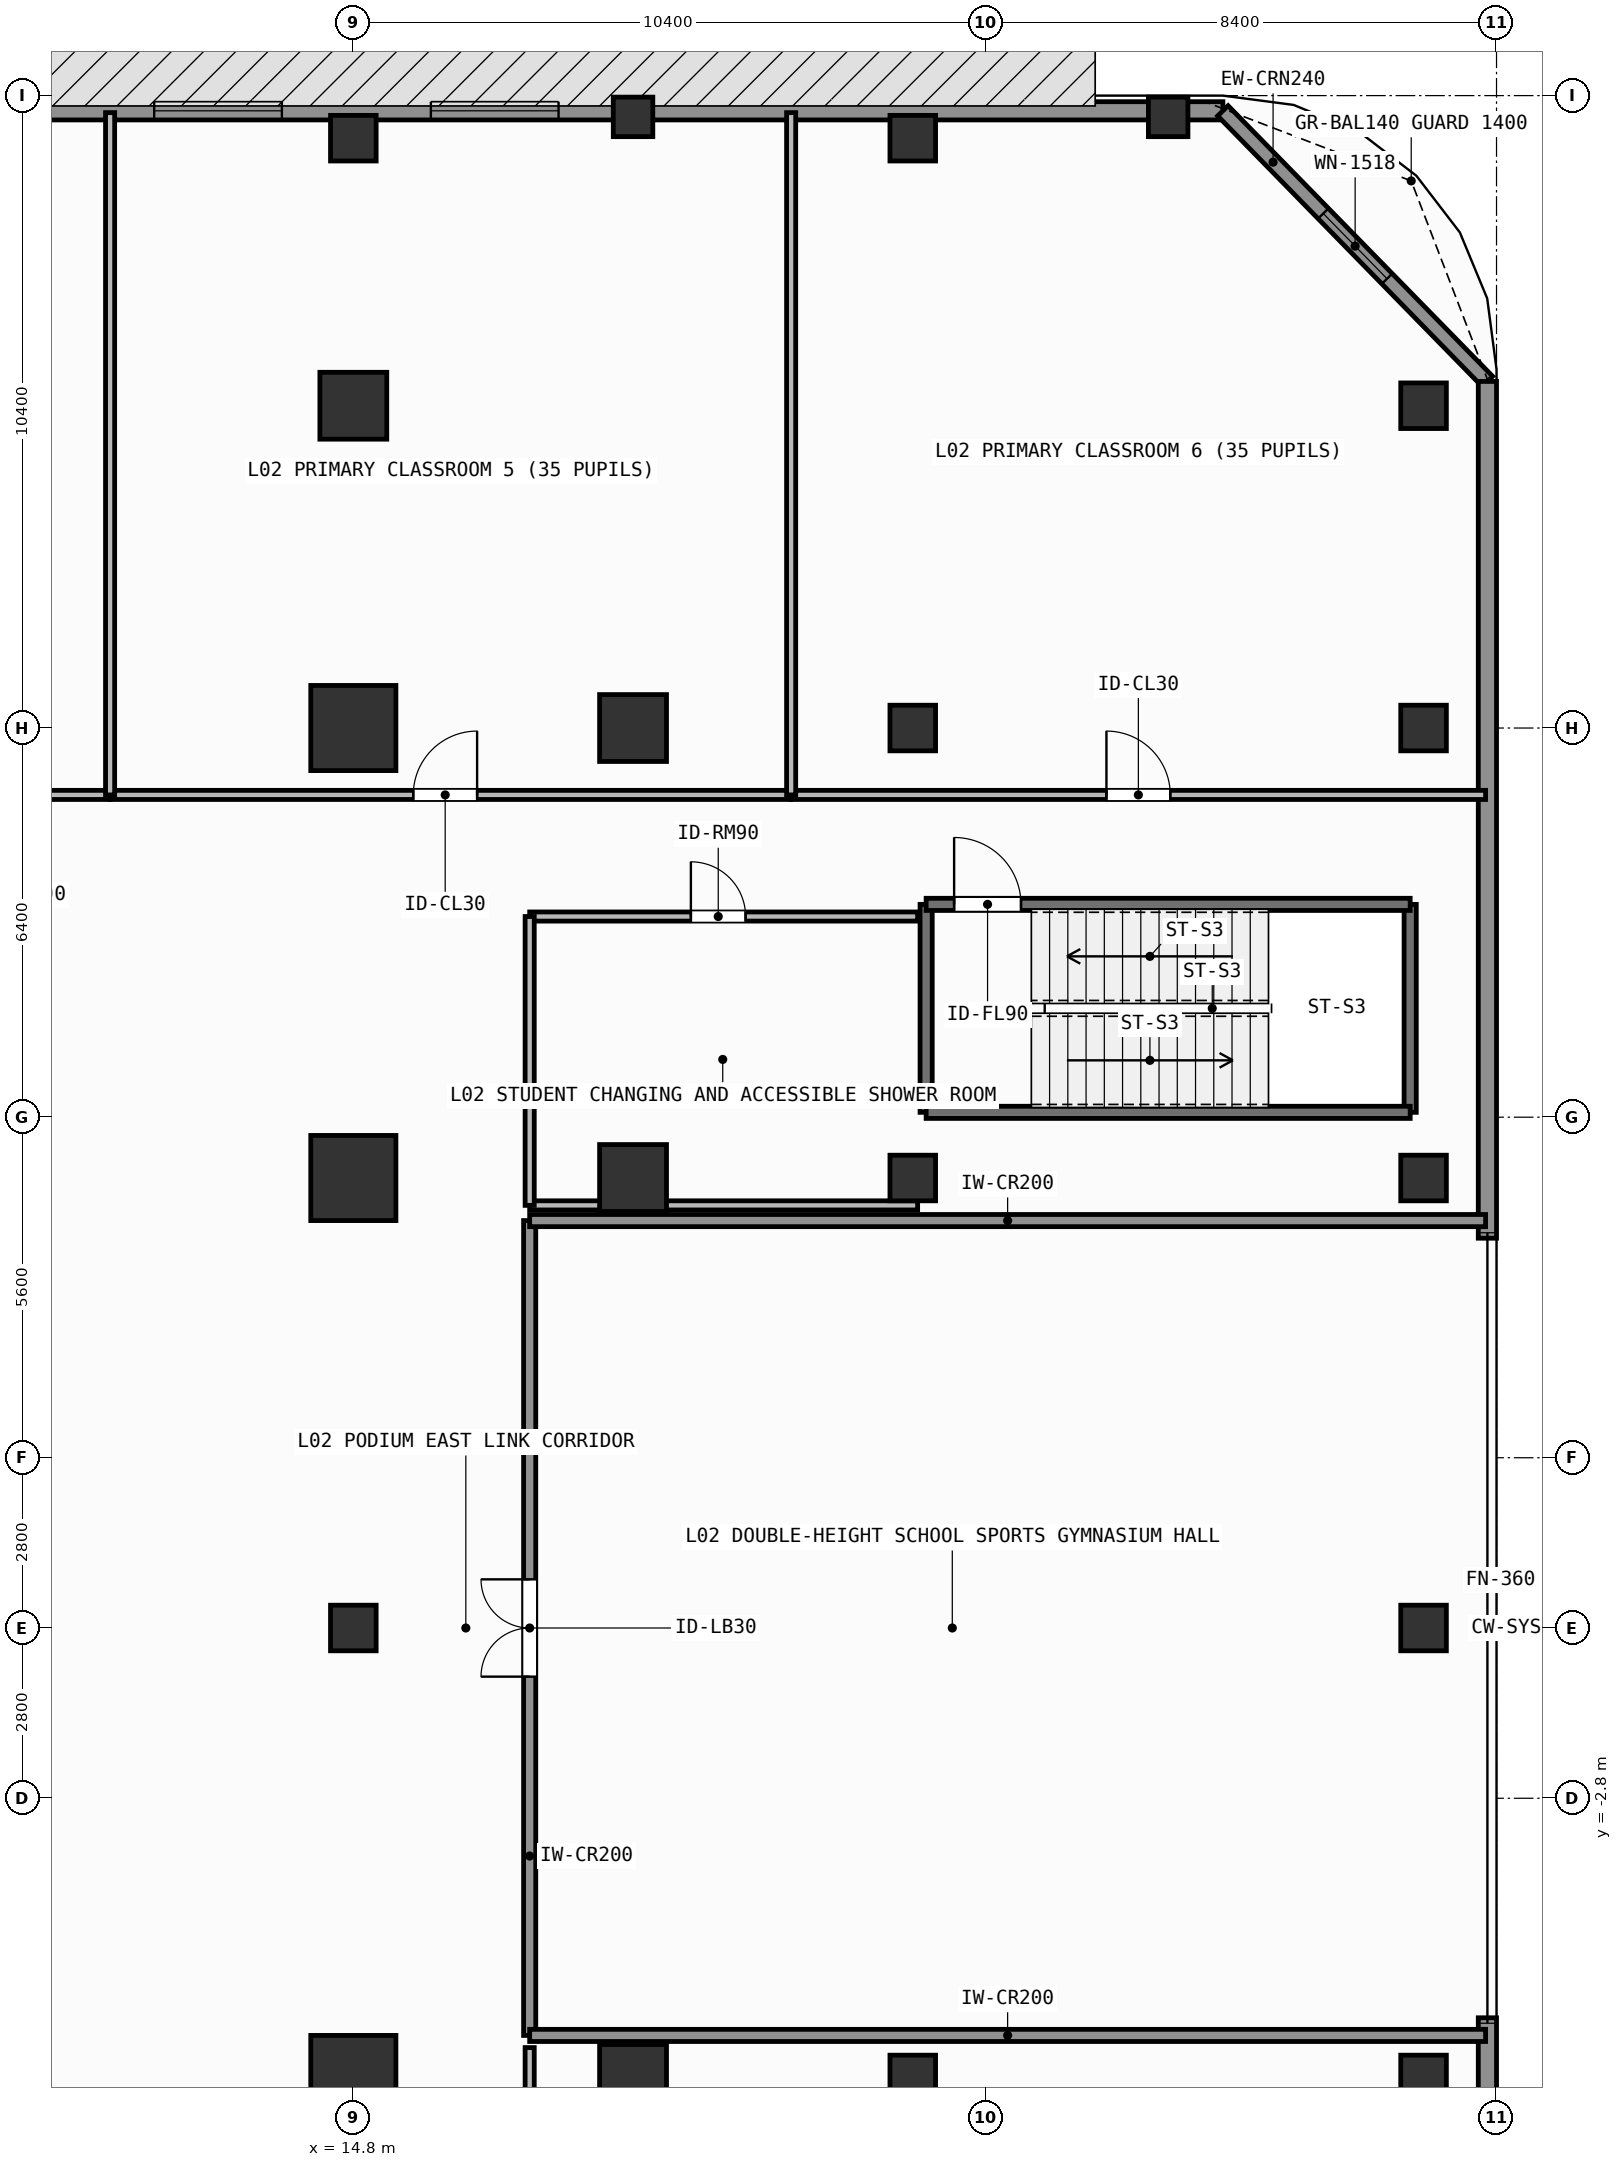
"""IFC4 building model, lengths in metres.
Left out: names, types, materials, properties, quantities, classifications, styles, units other than length and angle.
Written with IfcOpenShell. Run it as: python <this file> out.ifc"""

import sys

from ifc_helpers import new_model, si_unit, direction, frame, frame_2d, origin, origin_2d, place, context, subcontext, project, spatial, rectangle, extrude, element, fill, save


model = new_model("IFC4")
c1 = context("Model", 3, precision=1e-05, world=origin(), true_north=direction((0.0, 1.0)))
c2 = subcontext(c1, "Body", "Model", "MODEL_VIEW")
j1 = project(units=[si_unit("LENGTHUNIT", "METRE"), si_unit("PLANEANGLEUNIT", "RADIAN")], contexts=[c1])
p1 = place(None, origin())
s1 = spatial("IfcSite", under=j1, at=p1, CompositionType="ELEMENT")
p2 = place(p1, origin())
s2 = spatial("IfcBuilding", under=s1, at=p2, CompositionType="ELEMENT")
p3 = place(p2, frame((0.0, 0.0, 4.8)))
s3 = spatial("IfcBuildingStorey", under=s2, at=p3, CompositionType="ELEMENT", Elevation=4.8)
for number, where, z_axis, x_axis in (
    (1, (14.8, 14.8, 0.0), (0.0, 0.0, 1.0), (1.0, 0.0, 0.0)),
    (2, (14.8, -7.4, 0.0), (0.0, 0.0, 1.0), (1.0, 0.0, 0.0)),
    (3, (14.8, 7.4, 0.0), (0.0, 0.0, 1.0), (1.0, 0.0, 0.0)),
):
    element("IfcColumn", number, at=place(p3, frame(where, z_axis=z_axis, x_axis=x_axis)), inside=s3, PredefinedType="COLUMN", context=c2, shape_type="SweptSolid", body=[
        extrude(rectangle(XDim=1.4, YDim=1.4, at=origin_2d()), origin(), (0.0, 0.0, 1.0), 4.2),
    ])
for number, where, z_axis, x_axis in (
    (4, (19.4, -7.4, 0.0), (0.0, 0.0, 1.0), (1.0, 0.0, 0.0)),
    (5, (19.4, 7.4, 0.0), (0.0, 0.0, 1.0), (1.0, 0.0, 0.0)),
    (6, (19.4, 14.8, 0.0), (0.0, 0.0, 1.0), (1.0, 0.0, 0.0)),
    (7, (14.8, 20.1, 0.0), (0.0, 0.0, 1.0), (1.0, 0.0, 0.0)),
):
    element("IfcColumn", number, at=place(p3, frame(where, z_axis=z_axis, x_axis=x_axis)), inside=s3, PredefinedType="COLUMN", context=c2, shape_type="SweptSolid", body=[
        extrude(rectangle(XDim=1.1, YDim=1.1, at=origin_2d()), origin(), (0.0, 0.0, 1.0), 4.2),
    ])
for number, where, z_axis, x_axis in (
    (8, (14.8, 0.0, 0.0), (0.0, 0.0, 1.0), (1.0, 0.0, 0.0)),
    (9, (14.8, 24.5, 0.0), (0.0, 0.0, 1.0), (1.0, 0.0, 0.0)),
    (10, (24.0, -7.4, 0.0), (0.0, 0.0, 1.0), (1.0, 0.0, 0.0)),
    (11, (24.0, 7.4, 0.0), (0.0, 0.0, 1.0), (1.0, 0.0, 0.0)),
    (12, (24.0, 14.8, 0.0), (0.0, 0.0, 1.0), (1.0, 0.0, 0.0)),
    (13, (24.0, 24.5, 0.0), (0.0, 0.0, 1.0), (1.0, 0.0, 0.0)),
    (14, (32.4, -7.4, 0.0), (0.0, 0.0, 1.0), (1.0, 0.0, 0.0)),
    (15, (32.4, 0.0, 0.0), (0.0, 0.0, 1.0), (1.0, 0.0, 0.0)),
    (16, (32.4, 7.4, 0.0), (0.0, 0.0, 1.0), (1.0, 0.0, 0.0)),
    (17, (32.4, 14.8, 0.0), (0.0, 0.0, 1.0), (1.0, 0.0, 0.0)),
    (18, (32.4, 20.1, 0.0), (0.0, 0.0, 1.0), (1.0, 0.0, 0.0)),
):
    element("IfcColumn", number, at=place(p3, frame(where, z_axis=z_axis, x_axis=x_axis)), inside=s3, PredefinedType="COLUMN", context=c2, shape_type="SweptSolid", body=[
        extrude(rectangle(XDim=0.75, YDim=0.75, at=origin_2d()), origin(), (0.0, 0.0, 1.0), 4.2),
    ])
for number, where, z_axis, x_axis in (
    (19, (19.4, 24.85, 0.0), (0.0, 0.0, 1.0), (1.0, 0.0, 0.0)),
    (20, (28.2, 24.85, 0.0), (0.0, 0.0, 1.0), (1.0, 0.0, 0.0)),
):
    element("IfcColumn", number, at=place(p3, frame(where, z_axis=z_axis, x_axis=x_axis)), inside=s3, PredefinedType="PILASTER", context=c2, shape_type="SweptSolid", body=[
        extrude(rectangle(XDim=0.65, YDim=0.65, at=origin_2d()), origin(), (0.0, 0.0, 1.0), 4.2),
    ])
p4 = place(p3, frame((-29.1, 24.95, 0.0), z_axis=(0.0, 0.0, 1.0), x_axis=(1.0, 0.0, 0.0)))
e21 = element("IfcWall", 21, at=p4, inside=s3, PredefinedType="SOLIDWALL", context=c2, shape_type="SweptSolid", body=[
    extrude(rectangle(XDim=58.2, YDim=0.3, at=frame_2d((29.1, 0.0))), origin(), (0.0, 0.0, 1.0), 3.96),
])
p5 = place(p4, frame((24.35, 0.0, 0.85)))
e22 = element("IfcOpeningElement", 22, at=p5, cuts=e21, PredefinedType="OPENING", context=c2, shape_type="SweptSolid", body=[
    extrude(rectangle(XDim=2.1, YDim=2.2, at=frame_2d((1.05, 1.1))), frame((0.0, 0.16, 0.0), z_axis=(0.0, -1.0, 0.0), x_axis=(1.0, 0.0, 0.0)), (0.0, 0.0, 1.0), 0.32),
])
p6 = place(p4, frame((31.75, 0.0, 0.85)))
e23 = element("IfcOpeningElement", 23, at=p6, cuts=e21, PredefinedType="OPENING", context=c2, shape_type="SweptSolid", body=[
    extrude(rectangle(XDim=2.1, YDim=2.2, at=frame_2d((1.05, 1.1))), frame((0.0, 0.16, 0.0), z_axis=(0.0, -1.0, 0.0), x_axis=(1.0, 0.0, 0.0)), (0.0, 0.0, 1.0), 0.32),
])
p7 = place(p4, frame((40.625, 0.0, 0.85)))
e24 = element("IfcOpeningElement", 24, at=p7, cuts=e21, PredefinedType="OPENING", context=c2, shape_type="SweptSolid", body=[
    extrude(rectangle(XDim=2.1, YDim=2.2, at=frame_2d((1.05, 1.1))), frame((0.0, 0.16, 0.0), z_axis=(0.0, -1.0, 0.0), x_axis=(1.0, 0.0, 0.0)), (0.0, 0.0, 1.0), 0.32),
])
p8 = place(p4, frame((45.175, 0.0, 0.85)))
e25 = element("IfcOpeningElement", 25, at=p8, cuts=e21, PredefinedType="OPENING", context=c2, shape_type="SweptSolid", body=[
    extrude(rectangle(XDim=2.1, YDim=2.2, at=frame_2d((1.05, 1.1))), frame((0.0, 0.16, 0.0), z_axis=(0.0, -1.0, 0.0), x_axis=(1.0, 0.0, 0.0)), (0.0, 0.0, 1.0), 0.32),
])
p9 = place(p3, frame((29.1, 24.95, 0.0), z_axis=(0.0, 0.0, 1.0), x_axis=(0.69901822973, -0.715103848756, 0.0)))
e26 = element("IfcWall", 26, at=p9, inside=s3, PredefinedType="SOLIDWALL", context=c2, shape_type="SweptSolid", body=[
    extrude(rectangle(XDim=6.223, YDim=0.24, at=frame_2d((3.111, 0.0))), origin(), (0.0, 0.0, 1.0), 3.96),
])
p10 = place(p9, frame((2.362, 0.0, 0.85)))
e27 = element("IfcOpeningElement", 27, at=p10, cuts=e26, PredefinedType="OPENING", context=c2, shape_type="SweptSolid", body=[
    extrude(rectangle(XDim=1.5, YDim=1.85, at=frame_2d((0.75, 0.925))), frame((0.0, 0.13, 0.0), z_axis=(0.0, -1.0, 0.0), x_axis=(1.0, 0.0, 0.0)), (0.0, 0.0, 1.0), 0.26),
])
for number, where, z_axis, x_axis in (
    (28, (33.45, -20.5, 0.0), (0.0, 0.0, 1.0), (0.0, 1.0, 0.0)),
    (29, (33.45, 6.41, 0.0), (0.0, 0.0, 1.0), (0.0, 1.0, 0.0)),
):
    element("IfcWall", number, at=place(p3, frame(where, z_axis=z_axis, x_axis=x_axis)), inside=s3, PredefinedType="SOLIDWALL", context=c2, shape_type="SweptSolid", body=[
        extrude(rectangle(XDim=14.09, YDim=0.3, at=frame_2d((7.045, 0.0))), origin(), (0.0, 0.0, 1.0), 3.96),
    ])
for number, where, z_axis, x_axis in (
    (30, (24.22, 8.48, 0.0), (0.0, 0.0, 1.0), (0.0, 1.0, 0.0)),
    (31, (32.18, 11.9, 0.0), (0.0, 0.0, 1.0), (0.0, -1.0, 0.0)),
):
    element("IfcWall", number, at=place(p3, frame(where, z_axis=z_axis, x_axis=x_axis)), inside=s3, PredefinedType="SHEAR", context=c2, shape_type="SweptSolid", body=[
        extrude(rectangle(XDim=3.42, YDim=0.2, at=frame_2d((1.71, 0.0))), origin(), (0.0, 0.0, 1.0), 3.96),
    ])
p11 = place(p3, frame((32.18, 8.48, 0.0), z_axis=(0.0, 0.0, 1.0), x_axis=(-1.0, 0.0, 0.0)))
e32 = element("IfcWall", 32, at=p11, inside=s3, PredefinedType="SHEAR", context=c2, shape_type="SweptSolid", body=[
    extrude(rectangle(XDim=7.96, YDim=0.2, at=frame_2d((3.98, 0.0))), origin(), (0.0, 0.0, 1.0), 3.96),
])
p12 = place(p3, frame((24.22, 11.9, 0.0), z_axis=(0.0, 0.0, 1.0), x_axis=(1.0, 0.0, 0.0)))
e33 = element("IfcWall", 33, at=p12, inside=s3, PredefinedType="SHEAR", context=c2, shape_type="SweptSolid", body=[
    extrude(rectangle(XDim=7.96, YDim=0.2, at=frame_2d((3.98, 0.0))), origin(), (0.0, 0.0, 1.0), 3.96),
])
p13 = place(p12, frame((0.46, 0.0, 0.0)))
e34 = element("IfcOpeningElement", 34, at=p13, cuts=e33, PredefinedType="OPENING", context=c2, shape_type="SweptSolid", body=[
    extrude(rectangle(XDim=1.1, YDim=2.15, at=frame_2d((0.55, 1.075))), frame((0.0, 0.11, 0.0), z_axis=(0.0, -1.0, 0.0), x_axis=(1.0, 0.0, 0.0)), (0.0, 0.0, 1.0), 0.22),
])
p14 = place(p3, frame((-0.2, 13.7, 0.0), z_axis=(0.0, 0.0, 1.0), x_axis=(1.0, 0.0, 0.0)))
e35 = element("IfcWall", 35, at=p14, inside=s3, PredefinedType="PARTITIONING", context=c2, shape_type="SweptSolid", body=[
    extrude(rectangle(XDim=11.0, YDim=0.15, at=frame_2d((5.5, 0.0))), origin(), (0.0, 0.0, 1.0), 3.96),
])
p15 = place(p14, frame((4.975, 0.0, 0.0)))
e36 = element("IfcOpeningElement", 36, at=p15, cuts=e35, PredefinedType="OPENING", context=c2, shape_type="SweptSolid", body=[
    extrude(rectangle(XDim=1.05, YDim=2.2, at=frame_2d((0.525, 1.1))), frame((0.0, 0.085, 0.0), z_axis=(0.0, -1.0, 0.0), x_axis=(1.0, 0.0, 0.0)), (0.0, 0.0, 1.0), 0.17),
])
p16 = place(p3, frame((10.8, 13.7, 0.0), z_axis=(0.0, 0.0, 1.0), x_axis=(1.0, 0.0, 0.0)))
e37 = element("IfcWall", 37, at=p16, inside=s3, PredefinedType="PARTITIONING", context=c2, shape_type="SweptSolid", body=[
    extrude(rectangle(XDim=11.2, YDim=0.15, at=frame_2d((5.6, 0.0))), origin(), (0.0, 0.0, 1.0), 3.96),
])
p17 = place(p16, frame((4.986, 0.0, 0.0)))
e38 = element("IfcOpeningElement", 38, at=p17, cuts=e37, PredefinedType="OPENING", context=c2, shape_type="SweptSolid", body=[
    extrude(rectangle(XDim=1.05, YDim=2.2, at=frame_2d((0.525, 1.1))), frame((0.0, 0.085, 0.0), z_axis=(0.0, -1.0, 0.0), x_axis=(1.0, 0.0, 0.0)), (0.0, 0.0, 1.0), 0.17),
])
p18 = place(p3, frame((22.0, 13.7, 0.0), z_axis=(0.0, 0.0, 1.0), x_axis=(1.0, 0.0, 0.0)))
e39 = element("IfcWall", 39, at=p18, inside=s3, PredefinedType="PARTITIONING", context=c2, shape_type="SweptSolid", body=[
    extrude(rectangle(XDim=11.42, YDim=0.15, at=frame_2d((5.71, 0.0))), origin(), (0.0, 0.0, 1.0), 3.96),
])
p19 = place(p18, frame((5.185, 0.0, 0.0)))
e40 = element("IfcOpeningElement", 40, at=p19, cuts=e39, PredefinedType="OPENING", context=c2, shape_type="SweptSolid", body=[
    extrude(rectangle(XDim=1.05, YDim=2.2, at=frame_2d((0.525, 1.1))), frame((0.0, 0.085, 0.0), z_axis=(0.0, -1.0, 0.0), x_axis=(1.0, 0.0, 0.0)), (0.0, 0.0, 1.0), 0.17),
])
p20 = place(p3, frame((17.7, -6.7, 0.0), z_axis=(0.0, 0.0, 1.0), x_axis=(0.0, 1.0, 0.0)))
e41 = element("IfcWall", 41, at=p20, inside=s3, PredefinedType="SOLIDWALL", context=c2, shape_type="SweptSolid", body=[
    extrude(rectangle(XDim=13.4, YDim=0.2, at=frame_2d((6.7, 0.0))), origin(), (0.0, 0.0, 1.0), 3.96),
])
p21 = place(p20, frame((5.9, 0.0, 0.0)))
e42 = element("IfcOpeningElement", 42, at=p21, cuts=e41, PredefinedType="OPENING", context=c2, shape_type="SweptSolid", body=[
    extrude(rectangle(XDim=1.6, YDim=2.3, at=frame_2d((0.8, 1.15))), frame((0.0, 0.11, 0.0), z_axis=(0.0, -1.0, 0.0), x_axis=(1.0, 0.0, 0.0)), (0.0, 0.0, 1.0), 0.22),
])
p22 = place(p3, frame((17.7, 11.7, 0.0), z_axis=(0.0, 0.0, 1.0), x_axis=(1.0, 0.0, 0.0)))
e43 = element("IfcWall", 43, at=p22, inside=s3, PredefinedType="PARTITIONING", context=c2, shape_type="SweptSolid", body=[
    extrude(rectangle(XDim=6.38, YDim=0.15, at=frame_2d((3.19, 0.0))), origin(), (0.0, 0.0, 1.0), 3.96),
])
p23 = place(p22, frame((2.651, 0.0, 0.0)))
e44 = element("IfcOpeningElement", 44, at=p23, cuts=e43, PredefinedType="OPENING", context=c2, shape_type="SweptSolid", body=[
    extrude(rectangle(XDim=0.9, YDim=2.1, at=frame_2d((0.45, 1.05))), frame((0.0, 0.085, 0.0), z_axis=(0.0, -1.0, 0.0), x_axis=(1.0, 0.0, 0.0)), (0.0, 0.0, 1.0), 0.17),
])
p24 = place(p3, frame((17.7, -13.7, 0.0), z_axis=(0.0, 0.0, 1.0), x_axis=(0.0, 1.0, 0.0)))
e45 = element("IfcWall", 45, at=p24, inside=s3, PredefinedType="PARTITIONING", context=c2, shape_type="SweptSolid", body=[
    extrude(rectangle(XDim=6.8, YDim=0.15, at=frame_2d((3.4, 0.0))), origin(), (0.0, 0.0, 1.0), 3.96),
])
p25 = place(p24, frame((2.14, 0.0, 0.0)))
e46 = element("IfcOpeningElement", 46, at=p25, cuts=e45, PredefinedType="OPENING", context=c2, shape_type="SweptSolid", body=[
    extrude(rectangle(XDim=0.9, YDim=2.1, at=frame_2d((0.45, 1.05))), frame((0.0, 0.085, 0.0), z_axis=(0.0, -1.0, 0.0), x_axis=(1.0, 0.0, 0.0)), (0.0, 0.0, 1.0), 0.17),
])
for number, where, z_axis, x_axis in (
    (47, (10.8, 13.7, 0.0), (0.0, 0.0, 1.0), (0.0, 1.0, 0.0)),
    (48, (22.0, 13.7, 0.0), (0.0, 0.0, 1.0), (0.0, 1.0, 0.0)),
):
    element("IfcWall", number, at=place(p3, frame(where, z_axis=z_axis, x_axis=x_axis)), inside=s3, PredefinedType="PARTITIONING", context=c2, shape_type="SweptSolid", body=[
        extrude(rectangle(XDim=11.22, YDim=0.15, at=frame_2d((5.61, 0.0))), origin(), (0.0, 0.0, 1.0), 3.96),
    ])
for number, where, z_axis, x_axis in (
    (49, (17.7, -6.7, 0.0), (0.0, 0.0, 1.0), (1.0, 0.0, 0.0)),
    (50, (17.7, 6.7, 0.0), (0.0, 0.0, 1.0), (1.0, 0.0, 0.0)),
):
    element("IfcWall", number, at=place(p3, frame(where, z_axis=z_axis, x_axis=x_axis)), inside=s3, PredefinedType="SOLIDWALL", context=c2, shape_type="SweptSolid", body=[
        extrude(rectangle(XDim=15.72, YDim=0.2, at=frame_2d((7.86, 0.0))), origin(), (0.0, 0.0, 1.0), 3.96),
    ])
p26 = place(p3, frame((17.7, 6.95, 0.0), z_axis=(0.0, 0.0, 1.0), x_axis=(1.0, 0.0, 0.0)))
e51 = element("IfcWall", 51, at=p26, inside=s3, PredefinedType="PARTITIONING", context=c2, shape_type="SweptSolid", body=[
    extrude(rectangle(XDim=6.38, YDim=0.15, at=frame_2d((3.19, 0.0))), origin(), (0.0, 0.0, 1.0), 3.96),
])
p27 = place(p3, frame((17.7, 6.95, 0.0), z_axis=(0.0, 0.0, 1.0), x_axis=(0.0, 1.0, 0.0)))
e52 = element("IfcWall", 52, at=p27, inside=s3, PredefinedType="PARTITIONING", context=c2, shape_type="SweptSolid", body=[
    extrude(rectangle(XDim=4.75, YDim=0.15, at=frame_2d((2.375, 0.0))), origin(), (0.0, 0.0, 1.0), 3.96),
])
p28 = place(p10, origin())
e53 = element("IfcWindow", 53, at=p28, inside=s3, PartitioningType="SINGLE_PANEL", PredefinedType="WINDOW", context=c2, shape_type="SweptSolid", body=[
    extrude(rectangle(XDim=1.5, YDim=1.85, at=frame_2d((0.75, 0.925))), frame((0.0, 0.03, 0.0), z_axis=(0.0, -1.0, 0.0), x_axis=(1.0, 0.0, 0.0)), (0.0, 0.0, 1.0), 0.06),
])
fill(e27, e53)
p29 = place(p7, origin())
e54 = element("IfcWindow", 54, at=p29, inside=s3, PartitioningType="SINGLE_PANEL", PredefinedType="WINDOW", context=c2, shape_type="SweptSolid", body=[
    extrude(rectangle(XDim=2.1, YDim=2.2, at=frame_2d((1.05, 1.1))), frame((0.0, 0.03, 0.0), z_axis=(0.0, -1.0, 0.0), x_axis=(1.0, 0.0, 0.0)), (0.0, 0.0, 1.0), 0.06),
])
fill(e24, e54)
p30 = place(p8, origin())
e55 = element("IfcWindow", 55, at=p30, inside=s3, PartitioningType="SINGLE_PANEL", PredefinedType="WINDOW", context=c2, shape_type="SweptSolid", body=[
    extrude(rectangle(XDim=2.1, YDim=2.2, at=frame_2d((1.05, 1.1))), frame((0.0, 0.03, 0.0), z_axis=(0.0, -1.0, 0.0), x_axis=(1.0, 0.0, 0.0)), (0.0, 0.0, 1.0), 0.06),
])
fill(e25, e55)
p31 = place(p13, origin())
e56 = element("IfcDoor", 56, at=p31, inside=s3, OperationType="SINGLE_SWING_LEFT", PredefinedType="DOOR", context=c2, shape_type="SweptSolid", body=[
    extrude(rectangle(XDim=1.1, YDim=2.15, at=frame_2d((0.55, 1.075))), frame((0.0, 0.025, 0.0), z_axis=(0.0, -1.0, 0.0), x_axis=(1.0, 0.0, 0.0)), (0.0, 0.0, 1.0), 0.05),
])
fill(e34, e56)
p32 = place(p17, origin())
e57 = element("IfcDoor", 57, at=p32, inside=s3, OperationType="SINGLE_SWING_RIGHT", PredefinedType="DOOR", context=c2, shape_type="SweptSolid", body=[
    extrude(rectangle(XDim=1.05, YDim=2.2, at=frame_2d((0.525, 1.1))), frame((0.0, 0.025, 0.0), z_axis=(0.0, -1.0, 0.0), x_axis=(1.0, 0.0, 0.0)), (0.0, 0.0, 1.0), 0.05),
])
fill(e38, e57)
p33 = place(p19, origin())
e58 = element("IfcDoor", 58, at=p33, inside=s3, OperationType="SINGLE_SWING_LEFT", PredefinedType="DOOR", context=c2, shape_type="SweptSolid", body=[
    extrude(rectangle(XDim=1.05, YDim=2.2, at=frame_2d((0.525, 1.1))), frame((0.0, 0.025, 0.0), z_axis=(0.0, -1.0, 0.0), x_axis=(1.0, 0.0, 0.0)), (0.0, 0.0, 1.0), 0.05),
])
fill(e40, e58)
p34 = place(p21, origin())
e59 = element("IfcDoor", 59, at=p34, inside=s3, OperationType="SINGLE_SWING_LEFT", PredefinedType="DOOR", context=c2, shape_type="SweptSolid", body=[
    extrude(rectangle(XDim=1.6, YDim=2.3, at=frame_2d((0.8, 1.15))), frame((0.0, 0.025, 0.0), z_axis=(0.0, -1.0, 0.0), x_axis=(1.0, 0.0, 0.0)), (0.0, 0.0, 1.0), 0.05),
])
fill(e42, e59)
p35 = place(p23, origin())
e60 = element("IfcDoor", 60, at=p35, inside=s3, OperationType="SINGLE_SWING_LEFT", PredefinedType="DOOR", context=c2, shape_type="SweptSolid", body=[
    extrude(rectangle(XDim=0.9, YDim=2.1, at=frame_2d((0.45, 1.05))), frame((0.0, 0.025, 0.0), z_axis=(0.0, -1.0, 0.0), x_axis=(1.0, 0.0, 0.0)), (0.0, 0.0, 1.0), 0.05),
])
fill(e44, e60)
save(model, sys.argv[1])
